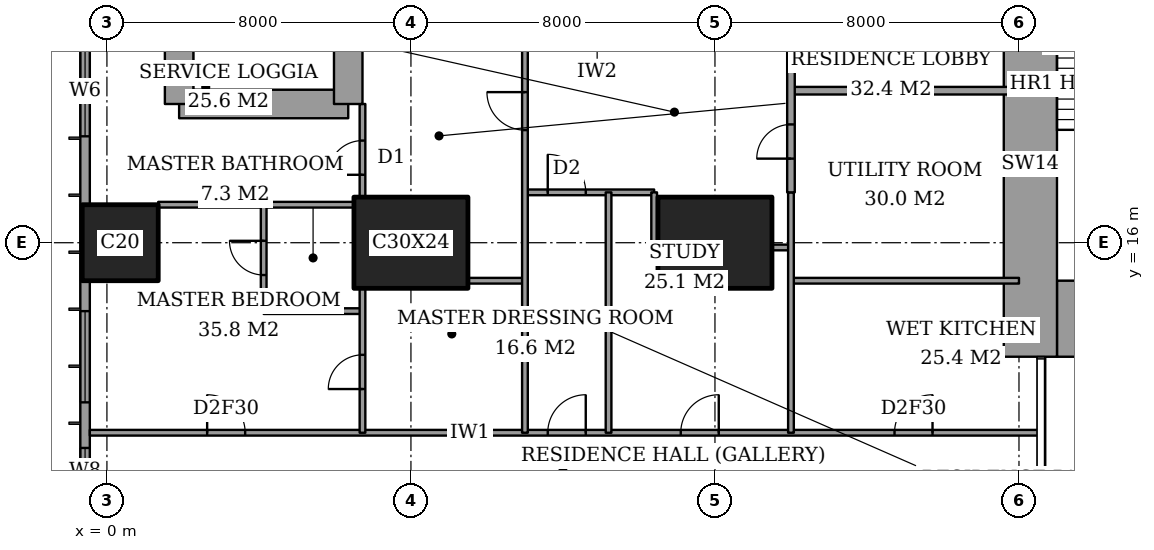
"""IFC4 building model, lengths in metres.
Left out: names, types, materials, properties, quantities, classifications, styles, units other than length and angle.
Written with IfcOpenShell. Run it as: python <this file> out.ifc"""

import sys

from ifc_helpers import new_model, si_unit, direction, frame, frame_2d, origin, origin_2d, place, context, subcontext, project, spatial, rectangle, extrude, element, fill, save


model = new_model("IFC4")
c1 = context("Model", 3, precision=1e-05, world=origin(), true_north=direction((0.0, 1.0)))
c2 = subcontext(c1, "Body", "Model", "MODEL_VIEW")
j1 = project(units=[si_unit("LENGTHUNIT", "METRE"), si_unit("PLANEANGLEUNIT", "RADIAN")], contexts=[c1])
p1 = place(None, origin())
s1 = spatial("IfcSite", under=j1, at=p1, CompositionType="ELEMENT")
p2 = place(p1, origin())
s2 = spatial("IfcBuilding", under=s1, at=p2, CompositionType="ELEMENT")
p3 = place(p2, frame((0.0, 0.0, 76.4)))
s3 = spatial("IfcBuildingStorey", under=s2, at=p3, CompositionType="ELEMENT", Elevation=76.4)
p4 = place(p3, frame((0.35, 16.0, 0.0), z_axis=(0.0, 0.0, 1.0), x_axis=(1.0, 0.0, 0.0)))
e1 = element("IfcColumn", 1, at=p4, inside=s3, PredefinedType="COLUMN", context=c2, shape_type="SweptSolid", body=[
    extrude(rectangle(XDim=2.0, YDim=2.0, at=origin_2d()), origin(), (0.0, 0.0, 1.0), 3.6),
])
for number, where, z_axis, x_axis in (
    (2, (8.0, 16.0, 0.0), (0.0, 0.0, 1.0), (1.0, 0.0, 0.0)),
    (3, (16.0, 16.0, 0.0), (0.0, 0.0, 1.0), (1.0, 0.0, 0.0)),
):
    element("IfcColumn", number, at=place(p3, frame(where, z_axis=z_axis, x_axis=x_axis)), inside=s3, PredefinedType="COLUMN", context=c2, shape_type="SweptSolid", body=[
        extrude(rectangle(XDim=3.0, YDim=2.4, at=origin_2d()), origin(), (0.0, 0.0, 1.0), 3.6),
    ])
p5 = place(p3, frame((25.0, 14.0, 0.0), z_axis=(0.0, 0.0, 1.0), x_axis=(1.0, 0.0, 0.0)))
e4 = element("IfcWall", 4, at=p5, inside=s3, PredefinedType="SHEAR", context=c2, shape_type="SweptSolid", body=[
    extrude(rectangle(XDim=3.15, YDim=2.0, at=frame_2d((1.575, 0.0))), origin(), (0.0, 0.0, 1.0), 3.6),
])
p6 = place(p3, frame((24.3, 13.0, 0.0), z_axis=(0.0, 0.0, 1.0), x_axis=(0.0, 1.0, 0.0)))
e5 = element("IfcWall", 5, at=p6, inside=s3, PredefinedType="SHEAR", context=c2, shape_type="SweptSolid", body=[
    extrude(rectangle(XDim=10.15, YDim=1.4, at=frame_2d((5.075, 0.0))), origin(), (0.0, 0.0, 1.0), 3.6),
])
p7 = place(p3, frame((1.9, 19.65, 0.0), z_axis=(0.0, 0.0, 1.0), x_axis=(1.0, 0.0, 0.0)))
e6 = element("IfcWall", 6, at=p7, inside=s3, PredefinedType="SHEAR", context=c2, shape_type="SweptSolid", body=[
    extrude(rectangle(XDim=4.45, YDim=0.75, at=frame_2d((2.225, 0.0))), origin(), (0.0, 0.0, 1.0), 3.6),
])
p8 = place(p3, frame((6.35, 19.65, 0.0), z_axis=(0.0, 0.0, 1.0), x_axis=(0.0, 1.0, 0.0)))
e7 = element("IfcWall", 7, at=p8, inside=s3, PredefinedType="SHEAR", context=c2, shape_type="SweptSolid", body=[
    extrude(rectangle(XDim=8.7, YDim=0.75, at=frame_2d((4.35, 0.0))), origin(), (0.0, 0.0, 1.0), 3.6),
])
p9 = place(p8, frame((6.725, 0.0, 0.0)))
e8 = element("IfcOpeningElement", 8, at=p9, cuts=e7, PredefinedType="OPENING", context=c2, shape_type="SweptSolid", body=[
    extrude(rectangle(XDim=1.0, YDim=2.1, at=frame_2d((0.5, 1.05))), frame((0.0, 0.385, 0.0), z_axis=(0.0, -1.0, 0.0), x_axis=(1.0, 0.0, 0.0)), (0.0, 0.0, 1.0), 0.77),
])
p10 = place(p3, frame((1.9, 28.35, 0.0), z_axis=(0.0, 0.0, 1.0), x_axis=(0.0, -1.0, 0.0)))
e9 = element("IfcWall", 9, at=p10, inside=s3, PredefinedType="SHEAR", context=c2, shape_type="SweptSolid", body=[
    extrude(rectangle(XDim=8.7, YDim=0.75, at=frame_2d((4.35, 0.0))), origin(), (0.0, 0.0, 1.0), 3.6),
])
p11 = place(p3, frame((-0.575, 44.825, 0.0), z_axis=(0.0, 0.0, 1.0), x_axis=(0.0, -1.0, 0.0)))
e10 = element("IfcWall", 10, at=p11, inside=s3, PredefinedType="SOLIDWALL", context=c2, shape_type="SweptSolid", body=[
    extrude(rectangle(XDim=41.65, YDim=0.25, at=frame_2d((20.825, 0.0))), origin(), (0.0, 0.0, 1.0), 3.6),
])
p12 = place(p11, frame((0.775, 0.0, 0.6)))
e11 = element("IfcOpeningElement", 11, at=p12, cuts=e10, PredefinedType="OPENING", context=c2, shape_type="SweptSolid", body=[
    extrude(rectangle(XDim=2.4, YDim=2.0, at=frame_2d((1.2, 1.0))), frame((0.0, 0.135, 0.0), z_axis=(0.0, -1.0, 0.0), x_axis=(1.0, 0.0, 0.0)), (0.0, 0.0, 1.0), 0.27),
])
p13 = place(p11, frame((6.1, 0.0, 0.6)))
e12 = element("IfcOpeningElement", 12, at=p13, cuts=e10, PredefinedType="OPENING", context=c2, shape_type="SweptSolid", body=[
    extrude(rectangle(XDim=1.2, YDim=2.0, at=frame_2d((0.6, 1.0))), frame((0.0, 0.135, 0.0), z_axis=(0.0, -1.0, 0.0), x_axis=(1.0, 0.0, 0.0)), (0.0, 0.0, 1.0), 0.27),
])
p14 = place(p11, frame((8.425, 0.0, 0.6)))
e13 = element("IfcOpeningElement", 13, at=p14, cuts=e10, PredefinedType="OPENING", context=c2, shape_type="SweptSolid", body=[
    extrude(rectangle(XDim=2.4, YDim=2.0, at=frame_2d((1.2, 1.0))), frame((0.0, 0.135, 0.0), z_axis=(0.0, -1.0, 0.0), x_axis=(1.0, 0.0, 0.0)), (0.0, 0.0, 1.0), 0.27),
])
p15 = place(p11, frame((15.625, 0.0, 0.6)))
e14 = element("IfcOpeningElement", 14, at=p15, cuts=e10, PredefinedType="OPENING", context=c2, shape_type="SweptSolid", body=[
    extrude(rectangle(XDim=2.4, YDim=2.0, at=frame_2d((1.2, 1.0))), frame((0.0, 0.135, 0.0), z_axis=(0.0, -1.0, 0.0), x_axis=(1.0, 0.0, 0.0)), (0.0, 0.0, 1.0), 0.27),
])
p16 = place(p11, frame((23.625, 0.0, 0.6)))
e15 = element("IfcOpeningElement", 15, at=p16, cuts=e10, PredefinedType="OPENING", context=c2, shape_type="SweptSolid", body=[
    extrude(rectangle(XDim=2.4, YDim=2.0, at=frame_2d((1.2, 1.0))), frame((0.0, 0.135, 0.0), z_axis=(0.0, -1.0, 0.0), x_axis=(1.0, 0.0, 0.0)), (0.0, 0.0, 1.0), 0.27),
])
p17 = place(p11, frame((30.625, 0.0, 0.6)))
e16 = element("IfcOpeningElement", 16, at=p17, cuts=e10, PredefinedType="OPENING", context=c2, shape_type="SweptSolid", body=[
    extrude(rectangle(XDim=2.4, YDim=2.0, at=frame_2d((1.2, 1.0))), frame((0.0, 0.135, 0.0), z_axis=(0.0, -1.0, 0.0), x_axis=(1.0, 0.0, 0.0)), (0.0, 0.0, 1.0), 0.27),
])
p18 = place(p11, frame((34.225, 0.0, 0.6)))
e17 = element("IfcOpeningElement", 17, at=p18, cuts=e10, PredefinedType="OPENING", context=c2, shape_type="SweptSolid", body=[
    extrude(rectangle(XDim=1.2, YDim=2.0, at=frame_2d((0.6, 1.0))), frame((0.0, 0.135, 0.0), z_axis=(0.0, -1.0, 0.0), x_axis=(1.0, 0.0, 0.0)), (0.0, 0.0, 1.0), 0.27),
])
p19 = place(p11, frame((38.475, 0.0, 0.6)))
e18 = element("IfcOpeningElement", 18, at=p19, cuts=e10, PredefinedType="OPENING", context=c2, shape_type="SweptSolid", body=[
    extrude(rectangle(XDim=2.4, YDim=2.0, at=frame_2d((1.2, 1.0))), frame((0.0, 0.135, 0.0), z_axis=(0.0, -1.0, 0.0), x_axis=(1.0, 0.0, 0.0)), (0.0, 0.0, 1.0), 0.27),
])
p20 = place(p3, frame((-0.45, 11.0, 0.0), z_axis=(0.0, 0.0, 1.0), x_axis=(1.0, 0.0, 0.0)))
e19 = element("IfcWall", 19, at=p20, inside=s3, PredefinedType="PARTITIONING", context=c2, shape_type="SweptSolid", body=[
    extrude(rectangle(XDim=25.011, YDim=0.15, at=frame_2d((12.505, 0.0))), origin(), (0.0, 0.0, 1.0), 3.35),
])
p21 = place(p20, frame((12.05, 0.0, 0.0)))
e20 = element("IfcOpeningElement", 20, at=p21, cuts=e19, PredefinedType="OPENING", context=c2, shape_type="SweptSolid", body=[
    extrude(rectangle(XDim=1.0, YDim=2.1, at=frame_2d((0.5, 1.05))), frame((0.0, 0.085, 0.0), z_axis=(0.0, -1.0, 0.0), x_axis=(1.0, 0.0, 0.0)), (0.0, 0.0, 1.0), 0.17),
])
p22 = place(p20, frame((3.087, 0.0, 0.0)))
e21 = element("IfcOpeningElement", 21, at=p22, cuts=e19, PredefinedType="OPENING", context=c2, shape_type="SweptSolid", body=[
    extrude(rectangle(XDim=1.0, YDim=2.1, at=frame_2d((0.5, 1.05))), frame((0.0, 0.085, 0.0), z_axis=(0.0, -1.0, 0.0), x_axis=(1.0, 0.0, 0.0)), (0.0, 0.0, 1.0), 0.17),
])
p23 = place(p20, frame((15.55, 0.0, 0.0)))
e22 = element("IfcOpeningElement", 22, at=p23, cuts=e19, PredefinedType="OPENING", context=c2, shape_type="SweptSolid", body=[
    extrude(rectangle(XDim=1.0, YDim=2.1, at=frame_2d((0.5, 1.05))), frame((0.0, 0.085, 0.0), z_axis=(0.0, -1.0, 0.0), x_axis=(1.0, 0.0, 0.0)), (0.0, 0.0, 1.0), 0.17),
])
p24 = place(p20, frame((21.175, 0.0, 0.0)))
e23 = element("IfcOpeningElement", 23, at=p24, cuts=e19, PredefinedType="OPENING", context=c2, shape_type="SweptSolid", body=[
    extrude(rectangle(XDim=1.0, YDim=2.1, at=frame_2d((0.5, 1.05))), frame((0.0, 0.085, 0.0), z_axis=(0.0, -1.0, 0.0), x_axis=(1.0, 0.0, 0.0)), (0.0, 0.0, 1.0), 0.17),
])
p25 = place(p3, frame((4.125, 14.2, 0.0), z_axis=(0.0, 0.0, 1.0), x_axis=(1.0, 0.0, 0.0)))
e24 = element("IfcWall", 24, at=p25, inside=s3, PredefinedType="PARTITIONING", context=c2, shape_type="SweptSolid", body=[
    extrude(rectangle(XDim=2.6, YDim=0.15, at=frame_2d((1.3, 0.0))), origin(), (0.0, 0.0, 1.0), 3.35),
])
p26 = place(p3, frame((9.5, 15.0, 0.0), z_axis=(0.0, 0.0, 1.0), x_axis=(1.0, 0.0, 0.0)))
e25 = element("IfcWall", 25, at=p26, inside=s3, PredefinedType="PARTITIONING", context=c2, shape_type="SweptSolid", body=[
    extrude(rectangle(XDim=1.5, YDim=0.15, at=frame_2d((0.75, 0.0))), origin(), (0.0, 0.0, 1.0), 3.35),
])
p27 = place(p3, frame((18.0, 15.0, 0.0), z_axis=(0.0, 0.0, 1.0), x_axis=(1.0, 0.0, 0.0)))
e26 = element("IfcWall", 26, at=p27, inside=s3, PredefinedType="PARTITIONING", context=c2, shape_type="SweptSolid", body=[
    extrude(rectangle(XDim=6.0, YDim=0.15, at=frame_2d((3.0, 0.0))), origin(), (0.0, 0.0, 1.0), 3.35),
])
p28 = place(p3, frame((17.5, 15.875, 0.0), z_axis=(0.0, 0.0, 1.0), x_axis=(1.0, 0.0, 0.0)))
e27 = element("IfcWall", 27, at=p28, inside=s3, PredefinedType="PARTITIONING", context=c2, shape_type="SweptSolid", body=[
    extrude(rectangle(XDim=0.5, YDim=0.15, at=frame_2d((0.25, 0.0))), origin(), (0.0, 0.0, 1.0), 2.634),
])
p29 = place(p3, frame((1.35, 17.0, 0.0), z_axis=(0.0, 0.0, 1.0), x_axis=(1.0, 0.0, 0.0)))
e28 = element("IfcWall", 28, at=p29, inside=s3, PredefinedType="PARTITIONING", context=c2, shape_type="SweptSolid", body=[
    extrude(rectangle(XDim=5.15, YDim=0.15, at=frame_2d((2.575, 0.0))), origin(), (0.0, 0.0, 1.0), 3.35),
])
p30 = place(p3, frame((11.0, 17.325, 0.0), z_axis=(0.0, 0.0, 1.0), x_axis=(1.0, 0.0, 0.0)))
e29 = element("IfcWall", 29, at=p30, inside=s3, PredefinedType="PARTITIONING", context=c2, shape_type="SweptSolid", body=[
    extrude(rectangle(XDim=3.4, YDim=0.15, at=frame_2d((1.7, 0.0))), origin(), (0.0, 0.0, 1.0), 3.35),
])
p31 = place(p30, frame((0.6, 0.0, 0.0)))
e30 = element("IfcOpeningElement", 30, at=p31, cuts=e29, PredefinedType="OPENING", context=c2, shape_type="SweptSolid", body=[
    extrude(rectangle(XDim=1.0, YDim=2.1, at=frame_2d((0.5, 1.05))), frame((0.0, 0.085, 0.0), z_axis=(0.0, -1.0, 0.0), x_axis=(1.0, 0.0, 0.0)), (0.0, 0.0, 1.0), 0.17),
])
p32 = place(p3, frame((18.0, 20.0, 0.0), z_axis=(0.0, 0.0, 1.0), x_axis=(1.0, 0.0, 0.0)))
e31 = element("IfcWall", 31, at=p32, inside=s3, PredefinedType="PARTITIONING", context=c2, shape_type="SweptSolid", body=[
    extrude(rectangle(XDim=6.0, YDim=0.2, at=frame_2d((3.0, 0.0))), origin(), (0.0, 0.0, 1.0), 3.35),
])
p33 = place(p3, frame((4.125, 14.2, 0.0), z_axis=(0.0, 0.0, 1.0), x_axis=(0.0, 1.0, 0.0)))
e32 = element("IfcWall", 32, at=p33, inside=s3, PredefinedType="PARTITIONING", context=c2, shape_type="SweptSolid", body=[
    extrude(rectangle(XDim=2.8, YDim=0.15, at=frame_2d((1.4, 0.0))), origin(), (0.0, 0.0, 1.0), 3.35),
])
p34 = place(p33, frame((0.95, 0.0, 0.0)))
e33 = element("IfcOpeningElement", 33, at=p34, cuts=e32, PredefinedType="OPENING", context=c2, shape_type="SweptSolid", body=[
    extrude(rectangle(XDim=0.9, YDim=2.1, at=frame_2d((0.45, 1.05))), frame((0.0, 0.085, 0.0), z_axis=(0.0, -1.0, 0.0), x_axis=(1.0, 0.0, 0.0)), (0.0, 0.0, 1.0), 0.17),
])
p35 = place(p3, frame((6.725, 11.0, 0.0), z_axis=(0.0, 0.0, 1.0), x_axis=(0.0, 1.0, 0.0)))
e34 = element("IfcWall", 34, at=p35, inside=s3, PredefinedType="PARTITIONING", context=c2, shape_type="SweptSolid", body=[
    extrude(rectangle(XDim=3.8, YDim=0.15, at=frame_2d((1.9, 0.0))), origin(), (0.0, 0.0, 1.0), 3.35),
])
p36 = place(p35, frame((1.15, 0.0, 0.0)))
e35 = element("IfcOpeningElement", 35, at=p36, cuts=e34, PredefinedType="OPENING", context=c2, shape_type="SweptSolid", body=[
    extrude(rectangle(XDim=0.9, YDim=2.1, at=frame_2d((0.45, 1.05))), frame((0.0, 0.085, 0.0), z_axis=(0.0, -1.0, 0.0), x_axis=(1.0, 0.0, 0.0)), (0.0, 0.0, 1.0), 0.17),
])
p37 = place(p3, frame((6.725, 17.2, 0.0), z_axis=(0.0, 0.0, 1.0), x_axis=(0.0, 1.0, 0.0)))
e36 = element("IfcWall", 36, at=p37, inside=s3, PredefinedType="PARTITIONING", context=c2, shape_type="SweptSolid", body=[
    extrude(rectangle(XDim=2.45, YDim=0.15, at=frame_2d((1.225, 0.0))), origin(), (0.0, 0.0, 1.0), 3.35),
])
p38 = place(p37, frame((0.587, 0.0, 0.0)))
e37 = element("IfcOpeningElement", 37, at=p38, cuts=e36, PredefinedType="OPENING", context=c2, shape_type="SweptSolid", body=[
    extrude(rectangle(XDim=0.9, YDim=2.1, at=frame_2d((0.45, 1.05))), frame((0.0, 0.085, 0.0), z_axis=(0.0, -1.0, 0.0), x_axis=(1.0, 0.0, 0.0)), (0.0, 0.0, 1.0), 0.17),
])
p39 = place(p3, frame((11.0, 11.0, 0.0), z_axis=(0.0, 0.0, 1.0), x_axis=(0.0, 1.0, 0.0)))
e38 = element("IfcWall", 38, at=p39, inside=s3, PredefinedType="PARTITIONING", context=c2, shape_type="SweptSolid", body=[
    extrude(rectangle(XDim=10.6, YDim=0.15, at=frame_2d((5.3, 0.0))), origin(), (0.0, 0.0, 1.0), 3.35),
])
p40 = place(p39, frame((7.962, 0.0, 0.0)))
e39 = element("IfcOpeningElement", 39, at=p40, cuts=e38, PredefinedType="OPENING", context=c2, shape_type="SweptSolid", body=[
    extrude(rectangle(XDim=1.0, YDim=2.1, at=frame_2d((0.5, 1.05))), frame((0.0, 0.085, 0.0), z_axis=(0.0, -1.0, 0.0), x_axis=(1.0, 0.0, 0.0)), (0.0, 0.0, 1.0), 0.17),
])
p41 = place(p3, frame((13.2, 11.0, 0.0), z_axis=(0.0, 0.0, 1.0), x_axis=(0.0, 1.0, 0.0)))
e40 = element("IfcWall", 40, at=p41, inside=s3, PredefinedType="PARTITIONING", context=c2, shape_type="SweptSolid", body=[
    extrude(rectangle(XDim=6.325, YDim=0.15, at=frame_2d((3.163, 0.0))), origin(), (0.0, 0.0, 1.0), 3.35),
])
p42 = place(p3, frame((14.4, 15.875, 0.0), z_axis=(0.0, 0.0, 1.0), x_axis=(0.0, 1.0, 0.0)))
e41 = element("IfcWall", 41, at=p42, inside=s3, PredefinedType="PARTITIONING", context=c2, shape_type="SweptSolid", body=[
    extrude(rectangle(XDim=1.45, YDim=0.15, at=frame_2d((0.725, 0.0))), origin(), (0.0, 0.0, 1.0), 3.35),
])
p43 = place(p3, frame((18.0, 17.325, 0.0), z_axis=(0.0, 0.0, 1.0), x_axis=(0.0, 1.0, 0.0)))
e42 = element("IfcWall", 42, at=p43, inside=s3, PredefinedType="PARTITIONING", context=c2, shape_type="SweptSolid", body=[
    extrude(rectangle(XDim=6.675, YDim=0.2, at=frame_2d((3.337, 0.0))), origin(), (0.0, 0.0, 1.0), 3.35),
])
p44 = place(p43, frame((4.075, 0.0, 0.0)))
e43 = element("IfcOpeningElement", 43, at=p44, cuts=e42, PredefinedType="OPENING", context=c2, shape_type="SweptSolid", body=[
    extrude(rectangle(XDim=1.2, YDim=2.4, at=frame_2d((0.6, 1.2))), frame((0.0, 0.11, 0.0), z_axis=(0.0, -1.0, 0.0), x_axis=(1.0, 0.0, 0.0)), (0.0, 0.0, 1.0), 0.22),
])
p45 = place(p43, frame((0.887, 0.0, 0.0)))
e44 = element("IfcOpeningElement", 44, at=p45, cuts=e42, PredefinedType="OPENING", context=c2, shape_type="SweptSolid", body=[
    extrude(rectangle(XDim=0.9, YDim=2.1, at=frame_2d((0.45, 1.05))), frame((0.0, 0.11, 0.0), z_axis=(0.0, -1.0, 0.0), x_axis=(1.0, 0.0, 0.0)), (0.0, 0.0, 1.0), 0.22),
])
p46 = place(p3, frame((18.0, 11.0, 0.0), z_axis=(0.0, 0.0, 1.0), x_axis=(0.0, 1.0, 0.0)))
e45 = element("IfcWall", 45, at=p46, inside=s3, PredefinedType="PARTITIONING", context=c2, shape_type="SweptSolid", body=[
    extrude(rectangle(XDim=6.325, YDim=0.15, at=frame_2d((3.163, 0.0))), origin(), (0.0, 0.0, 1.0), 3.35),
])
p47 = place(p16, origin())
e46 = element("IfcWindow", 46, at=p47, inside=s3, PartitioningType="SINGLE_PANEL", PredefinedType="WINDOW", context=c2, shape_type="SweptSolid", body=[
    extrude(rectangle(XDim=2.4, YDim=2.0, at=frame_2d((1.2, 1.0))), frame((0.0, 0.03, 0.0), z_axis=(0.0, -1.0, 0.0), x_axis=(1.0, 0.0, 0.0)), (0.0, 0.0, 1.0), 0.06),
])
fill(e15, e46)
p48 = place(p17, origin())
e47 = element("IfcWindow", 47, at=p48, inside=s3, PartitioningType="SINGLE_PANEL", PredefinedType="WINDOW", context=c2, shape_type="SweptSolid", body=[
    extrude(rectangle(XDim=2.4, YDim=2.0, at=frame_2d((1.2, 1.0))), frame((0.0, 0.03, 0.0), z_axis=(0.0, -1.0, 0.0), x_axis=(1.0, 0.0, 0.0)), (0.0, 0.0, 1.0), 0.06),
])
fill(e16, e47)
p49 = place(p18, origin())
e48 = element("IfcWindow", 48, at=p49, inside=s3, PartitioningType="SINGLE_PANEL", PredefinedType="WINDOW", context=c2, shape_type="SweptSolid", body=[
    extrude(rectangle(XDim=1.2, YDim=2.0, at=frame_2d((0.6, 1.0))), frame((0.0, 0.03, 0.0), z_axis=(0.0, -1.0, 0.0), x_axis=(1.0, 0.0, 0.0)), (0.0, 0.0, 1.0), 0.06),
])
fill(e17, e48)
p50 = place(p21, origin())
e49 = element("IfcDoor", 49, at=p50, inside=s3, OperationType="SINGLE_SWING_LEFT", PredefinedType="DOOR", context=c2, shape_type="SweptSolid", body=[
    extrude(rectangle(XDim=1.0, YDim=2.1, at=frame_2d((0.5, 1.05))), frame((0.0, 0.025, 0.0), z_axis=(0.0, -1.0, 0.0), x_axis=(1.0, 0.0, 0.0)), (0.0, 0.0, 1.0), 0.05),
])
fill(e20, e49)
p51 = place(p34, origin())
e50 = element("IfcDoor", 50, at=p51, inside=s3, OperationType="SINGLE_SWING_LEFT", PredefinedType="DOOR", context=c2, shape_type="SweptSolid", body=[
    extrude(rectangle(XDim=0.9, YDim=2.1, at=frame_2d((0.45, 1.05))), frame((0.0, 0.025, 0.0), z_axis=(0.0, -1.0, 0.0), x_axis=(1.0, 0.0, 0.0)), (0.0, 0.0, 1.0), 0.05),
])
fill(e33, e50)
p52 = place(p22, origin())
e51 = element("IfcDoor", 51, at=p52, inside=s3, OperationType="SINGLE_SWING_RIGHT", PredefinedType="DOOR", context=c2, shape_type="SweptSolid", body=[
    extrude(rectangle(XDim=1.0, YDim=2.1, at=frame_2d((0.5, 1.05))), frame((0.0, 0.025, 0.0), z_axis=(0.0, -1.0, 0.0), x_axis=(1.0, 0.0, 0.0)), (0.0, 0.0, 1.0), 0.05),
])
fill(e21, e51)
p53 = place(p38, origin())
e52 = element("IfcDoor", 52, at=p53, inside=s3, OperationType="SINGLE_SWING_RIGHT", PredefinedType="DOOR", context=c2, shape_type="SweptSolid", body=[
    extrude(rectangle(XDim=0.9, YDim=2.1, at=frame_2d((0.45, 1.05))), frame((0.0, 0.025, 0.0), z_axis=(0.0, -1.0, 0.0), x_axis=(1.0, 0.0, 0.0)), (0.0, 0.0, 1.0), 0.05),
])
fill(e37, e52)
p54 = place(p36, origin())
e53 = element("IfcDoor", 53, at=p54, inside=s3, OperationType="SINGLE_SWING_RIGHT", PredefinedType="DOOR", context=c2, shape_type="SweptSolid", body=[
    extrude(rectangle(XDim=0.9, YDim=2.1, at=frame_2d((0.45, 1.05))), frame((0.0, 0.025, 0.0), z_axis=(0.0, -1.0, 0.0), x_axis=(1.0, 0.0, 0.0)), (0.0, 0.0, 1.0), 0.05),
])
fill(e35, e53)
p55 = place(p40, origin())
e54 = element("IfcDoor", 54, at=p55, inside=s3, OperationType="SINGLE_SWING_LEFT", PredefinedType="DOOR", context=c2, shape_type="SweptSolid", body=[
    extrude(rectangle(XDim=1.0, YDim=2.1, at=frame_2d((0.5, 1.05))), frame((0.0, 0.025, 0.0), z_axis=(0.0, -1.0, 0.0), x_axis=(1.0, 0.0, 0.0)), (0.0, 0.0, 1.0), 0.05),
])
fill(e39, e54)
p56 = place(p31, origin())
e55 = element("IfcDoor", 55, at=p56, inside=s3, OperationType="SINGLE_SWING_RIGHT", PredefinedType="DOOR", context=c2, shape_type="SweptSolid", body=[
    extrude(rectangle(XDim=1.0, YDim=2.1, at=frame_2d((0.5, 1.05))), frame((0.0, 0.025, 0.0), z_axis=(0.0, -1.0, 0.0), x_axis=(1.0, 0.0, 0.0)), (0.0, 0.0, 1.0), 0.05),
])
fill(e30, e55)
p57 = place(p23, origin())
e56 = element("IfcDoor", 56, at=p57, inside=s3, OperationType="SINGLE_SWING_LEFT", PredefinedType="DOOR", context=c2, shape_type="SweptSolid", body=[
    extrude(rectangle(XDim=1.0, YDim=2.1, at=frame_2d((0.5, 1.05))), frame((0.0, 0.025, 0.0), z_axis=(0.0, -1.0, 0.0), x_axis=(1.0, 0.0, 0.0)), (0.0, 0.0, 1.0), 0.05),
])
fill(e22, e56)
p58 = place(p24, origin())
e57 = element("IfcDoor", 57, at=p58, inside=s3, OperationType="SINGLE_SWING_LEFT", PredefinedType="DOOR", context=c2, shape_type="SweptSolid", body=[
    extrude(rectangle(XDim=1.0, YDim=2.1, at=frame_2d((0.5, 1.05))), frame((0.0, 0.025, 0.0), z_axis=(0.0, -1.0, 0.0), x_axis=(1.0, 0.0, 0.0)), (0.0, 0.0, 1.0), 0.05),
])
fill(e23, e57)
p59 = place(p45, origin())
e58 = element("IfcDoor", 58, at=p59, inside=s3, OperationType="SINGLE_SWING_RIGHT", PredefinedType="DOOR", context=c2, shape_type="SweptSolid", body=[
    extrude(rectangle(XDim=0.9, YDim=2.1, at=frame_2d((0.45, 1.05))), frame((0.0, 0.025, 0.0), z_axis=(0.0, -1.0, 0.0), x_axis=(1.0, 0.0, 0.0)), (0.0, 0.0, 1.0), 0.05),
])
fill(e44, e58)
save(model, sys.argv[1])
